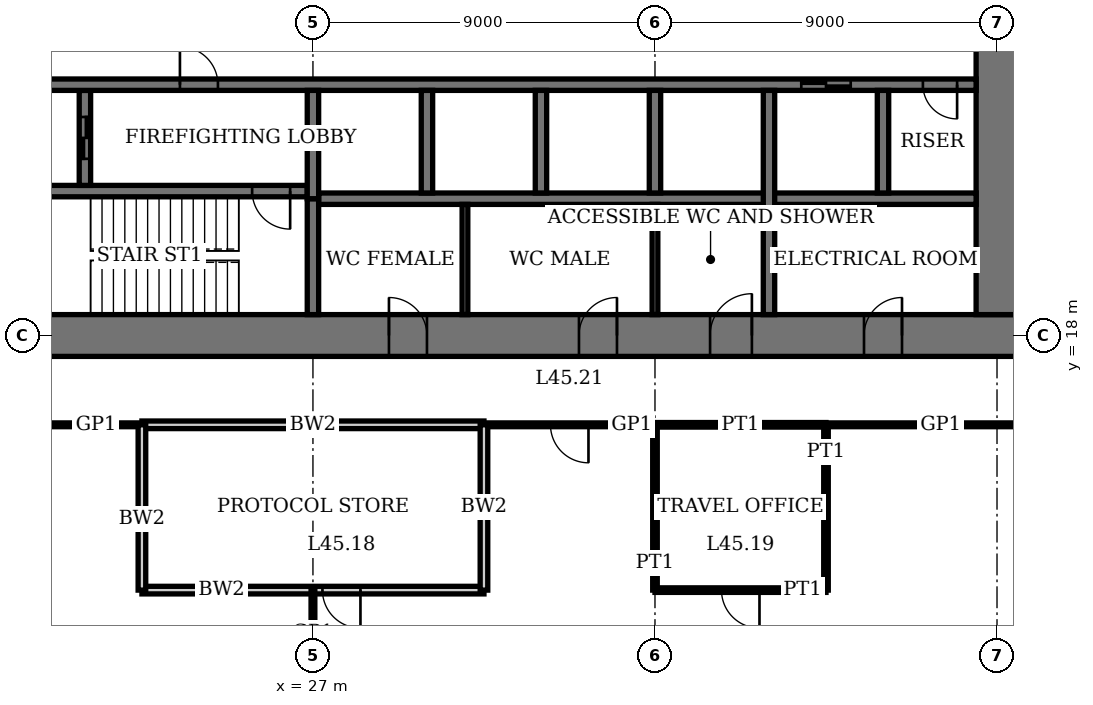
"""IFC4 building model, lengths in metres.
Left out: names, types, materials, properties, quantities, classifications, styles, units other than length and angle.
Written with IfcOpenShell. Run it as: python <this file> out.ifc"""

import sys

from ifc_helpers import new_model, si_unit, direction, frame, frame_2d, origin, place, context, subcontext, project, spatial, rectangle, extrude, element, fill, save


model = new_model("IFC4")
c1 = context("Model", 3, precision=1e-05, world=origin(), true_north=direction((0.0, 1.0)))
c2 = subcontext(c1, "Body", "Model", "MODEL_VIEW")
j1 = project(units=[si_unit("LENGTHUNIT", "METRE"), si_unit("PLANEANGLEUNIT", "RADIAN")], contexts=[c1])
p1 = place(None, origin())
s1 = spatial("IfcSite", under=j1, at=p1, CompositionType="ELEMENT")
p2 = place(p1, origin())
s2 = spatial("IfcBuilding", under=s1, at=p2, CompositionType="ELEMENT")
p3 = place(p2, frame((0.0, 0.0, 186.2)))
s3 = spatial("IfcBuildingStorey", under=s2, at=p3, CompositionType="ELEMENT", Elevation=186.2)
p4 = place(p3, frame((17.45, 18.0, 0.0), z_axis=(0.0, 0.0, 1.0), x_axis=(1.0, 0.0, 0.0)))
e1 = element("IfcWall", 1, at=p4, inside=s3, PredefinedType="SHEAR", context=c2, shape_type="SweptSolid", body=[
    extrude(rectangle(XDim=28.1, YDim=1.1, at=frame_2d((14.05, 0.0))), origin(), (0.0, 0.0, 1.0), 4.0),
])
p5 = place(p4, frame((11.55, 0.0, 0.0)))
e2 = element("IfcOpeningElement", 2, at=p5, cuts=e1, PredefinedType="OPENING", context=c2, shape_type="SweptSolid", body=[
    extrude(rectangle(XDim=1.0, YDim=2.4, at=frame_2d((0.5, 1.2))), frame((0.0, 0.56, 0.0), z_axis=(0.0, -1.0, 0.0), x_axis=(1.0, 0.0, 0.0)), (0.0, 0.0, 1.0), 1.12),
])
p6 = place(p4, frame((16.55, 0.0, 0.0)))
e3 = element("IfcOpeningElement", 3, at=p6, cuts=e1, PredefinedType="OPENING", context=c2, shape_type="SweptSolid", body=[
    extrude(rectangle(XDim=1.0, YDim=2.4, at=frame_2d((0.5, 1.2))), frame((0.0, 0.56, 0.0), z_axis=(0.0, -1.0, 0.0), x_axis=(1.0, 0.0, 0.0)), (0.0, 0.0, 1.0), 1.12),
])
p7 = place(p4, frame((20.0, 0.0, 0.0)))
e4 = element("IfcOpeningElement", 4, at=p7, cuts=e1, PredefinedType="OPENING", context=c2, shape_type="SweptSolid", body=[
    extrude(rectangle(XDim=1.1, YDim=2.4, at=frame_2d((0.55, 1.2))), frame((0.0, 0.56, 0.0), z_axis=(0.0, -1.0, 0.0), x_axis=(1.0, 0.0, 0.0)), (0.0, 0.0, 1.0), 1.12),
])
p8 = place(p4, frame((24.05, 0.0, 0.0)))
e5 = element("IfcOpeningElement", 5, at=p8, cuts=e1, PredefinedType="OPENING", context=c2, shape_type="SweptSolid", body=[
    extrude(rectangle(XDim=1.0, YDim=2.4, at=frame_2d((0.5, 1.2))), frame((0.0, 0.56, 0.0), z_axis=(0.0, -1.0, 0.0), x_axis=(1.0, 0.0, 0.0)), (0.0, 0.0, 1.0), 1.12),
])
p9 = place(p3, frame((45.0, 18.55, 0.0), z_axis=(0.0, 0.0, 1.0), x_axis=(0.0, 1.0, 0.0)))
e6 = element("IfcWall", 6, at=p9, inside=s3, PredefinedType="SHEAR", context=c2, shape_type="SweptSolid", body=[
    extrude(rectangle(XDim=16.9, YDim=1.1, at=frame_2d((8.45, 0.0))), origin(), (0.0, 0.0, 1.0), 4.0),
])
p10 = place(p9, frame((8.45, 0.0, 0.0)))
e7 = element("IfcOpeningElement", 7, at=p10, cuts=e6, PredefinedType="OPENING", context=c2, shape_type="SweptSolid", body=[
    extrude(rectangle(XDim=1.8, YDim=2.4, at=frame_2d((0.9, 1.2))), frame((0.0, 0.56, 0.0), z_axis=(0.0, -1.0, 0.0), x_axis=(1.0, 0.0, 0.0)), (0.0, 0.0, 1.0), 1.12),
])
p11 = place(p3, frame((18.55, 21.8, 0.0), z_axis=(0.0, 0.0, 1.0), x_axis=(1.0, 0.0, 0.0)))
e8 = element("IfcWall", 8, at=p11, inside=s3, PredefinedType="SHEAR", context=c2, shape_type="SweptSolid", body=[
    extrude(rectangle(XDim=8.3, YDim=0.3, at=frame_2d((4.15, 0.0))), origin(), (0.0, 0.0, 1.0), 4.0),
])
p12 = place(p11, frame((6.85, 0.0, 0.0)))
e9 = element("IfcOpeningElement", 9, at=p12, cuts=e8, PredefinedType="OPENING", context=c2, shape_type="SweptSolid", body=[
    extrude(rectangle(XDim=1.0, YDim=2.4, at=frame_2d((0.5, 1.2))), frame((0.0, 0.16, 0.0), z_axis=(0.0, -1.0, 0.0), x_axis=(1.0, 0.0, 0.0)), (0.0, 0.0, 1.0), 0.32),
])
p13 = place(p3, frame((27.0, 18.55, 0.0), z_axis=(0.0, 0.0, 1.0), x_axis=(0.0, 1.0, 0.0)))
e10 = element("IfcWall", 10, at=p13, inside=s3, PredefinedType="SHEAR", context=c2, shape_type="SweptSolid", body=[
    extrude(rectangle(XDim=3.05, YDim=0.3, at=frame_2d((1.525, 0.0))), origin(), (0.0, 0.0, 1.0), 4.0),
])
p14 = place(p3, frame((21.0, 21.95, 0.0), z_axis=(0.0, 0.0, 1.0), x_axis=(0.0, 1.0, 0.0)))
e11 = element("IfcWall", 11, at=p14, inside=s3, PredefinedType="SHEAR", context=c2, shape_type="SweptSolid", body=[
    extrude(rectangle(XDim=2.5, YDim=0.3, at=frame_2d((1.25, 0.0))), origin(), (0.0, 0.0, 1.0), 4.0),
])
p15 = place(p14, frame((0.7, 0.0, 0.0)))
e12 = element("IfcOpeningElement", 12, at=p15, cuts=e11, PredefinedType="OPENING", context=c2, shape_type="SweptSolid", body=[
    extrude(rectangle(XDim=1.1, YDim=2.4, at=frame_2d((0.55, 1.2))), frame((0.0, 0.16, 0.0), z_axis=(0.0, -1.0, 0.0), x_axis=(1.0, 0.0, 0.0)), (0.0, 0.0, 1.0), 0.32),
])
p16 = place(p3, frame((18.55, 24.6, 0.0), z_axis=(0.0, 0.0, 1.0), x_axis=(1.0, 0.0, 0.0)))
e13 = element("IfcWall", 13, at=p16, inside=s3, PredefinedType="SHEAR", context=c2, shape_type="SweptSolid", body=[
    extrude(rectangle(XDim=25.9, YDim=0.3, at=frame_2d((12.95, 0.0))), origin(), (0.0, 0.0, 1.0), 4.0),
])
p17 = place(p16, frame((4.95, 0.0, 0.0)))
e14 = element("IfcOpeningElement", 14, at=p17, cuts=e13, PredefinedType="OPENING", context=c2, shape_type="SweptSolid", body=[
    extrude(rectangle(XDim=1.0, YDim=2.4, at=frame_2d((0.5, 1.2))), frame((0.0, 0.16, 0.0), z_axis=(0.0, -1.0, 0.0), x_axis=(1.0, 0.0, 0.0)), (0.0, 0.0, 1.0), 0.32),
])
p18 = place(p16, frame((24.5, 0.0, 0.0)))
e15 = element("IfcOpeningElement", 15, at=p18, cuts=e13, PredefinedType="OPENING", context=c2, shape_type="SweptSolid", body=[
    extrude(rectangle(XDim=0.9, YDim=2.1, at=frame_2d((0.45, 1.05))), frame((0.0, 0.16, 0.0), z_axis=(0.0, -1.0, 0.0), x_axis=(1.0, 0.0, 0.0)), (0.0, 0.0, 1.0), 0.32),
])
p19 = place(p16, frame((21.3, 0.0, 0.0)))
e16 = element("IfcOpeningElement", 16, at=p19, cuts=e13, PredefinedType="OPENING", context=c2, shape_type="SweptSolid", body=[
    extrude(rectangle(XDim=1.3, YDim=2.4, at=frame_2d((0.65, 1.2))), frame((0.0, 0.16, 0.0), z_axis=(0.0, -1.0, 0.0), x_axis=(1.0, 0.0, 0.0)), (0.0, 0.0, 1.0), 0.32),
])
p20 = place(p3, frame((27.15, 21.6, 0.0), z_axis=(0.0, 0.0, 1.0), x_axis=(1.0, 0.0, 0.0)))
e17 = element("IfcWall", 17, at=p20, inside=s3, PredefinedType="SHEAR", context=c2, shape_type="SweptSolid", body=[
    extrude(rectangle(XDim=17.3, YDim=0.3, at=frame_2d((8.65, 0.0))), origin(), (0.0, 0.0, 1.0), 4.0),
])
for number, where, z_axis, x_axis in (
    (18, (30.0, 21.75, 0.0), (0.0, 0.0, 1.0), (0.0, 1.0, 0.0)),
    (19, (33.0, 21.75, 0.0), (0.0, 0.0, 1.0), (0.0, 1.0, 0.0)),
    (20, (36.0, 21.75, 0.0), (0.0, 0.0, 1.0), (0.0, 1.0, 0.0)),
):
    element("IfcWall", number, at=place(p3, frame(where, z_axis=z_axis, x_axis=x_axis)), inside=s3, PredefinedType="SHEAR", context=c2, shape_type="SweptSolid", body=[
        extrude(rectangle(XDim=2.7, YDim=0.3, at=frame_2d((1.35, 0.0))), origin(), (0.0, 0.0, 1.0), 4.0),
    ])
p21 = place(p3, frame((39.0, 18.55, 0.0), z_axis=(0.0, 0.0, 1.0), x_axis=(0.0, 1.0, 0.0)))
e21 = element("IfcWall", 21, at=p21, inside=s3, PredefinedType="SHEAR", context=c2, shape_type="SweptSolid", body=[
    extrude(rectangle(XDim=5.9, YDim=0.3, at=frame_2d((2.95, 0.0))), origin(), (0.0, 0.0, 1.0), 4.0),
])
p22 = place(p3, frame((42.0, 21.75, 0.0), z_axis=(0.0, 0.0, 1.0), x_axis=(0.0, 1.0, 0.0)))
e22 = element("IfcWall", 22, at=p22, inside=s3, PredefinedType="SHEAR", context=c2, shape_type="SweptSolid", body=[
    extrude(rectangle(XDim=2.7, YDim=0.3, at=frame_2d((1.35, 0.0))), origin(), (0.0, 0.0, 1.0), 4.0),
])
p23 = place(p3, frame((27.0, 21.6, 0.0), z_axis=(0.0, 0.0, 1.0), x_axis=(0.0, 1.0, 0.0)))
e23 = element("IfcWall", 23, at=p23, inside=s3, PredefinedType="SHEAR", context=c2, shape_type="SweptSolid", body=[
    extrude(rectangle(XDim=2.85, YDim=0.3, at=frame_2d((1.425, 0.0))), origin(), (0.0, 0.0, 1.0), 4.0),
])
p24 = place(p3, frame((22.5, 11.3, 0.0), z_axis=(0.0, 0.0, 1.0), x_axis=(1.0, 0.0, 0.0)))
e24 = element("IfcWall", 24, at=p24, inside=s3, PredefinedType="SOLIDWALL", context=c2, shape_type="SweptSolid", body=[
    extrude(rectangle(XDim=9.0, YDim=0.2, at=frame_2d((4.5, 0.0))), origin(), (0.0, 0.0, 1.0), 3.75),
])
p25 = place(p24, frame((4.75, 0.0, 0.0)))
e25 = element("IfcOpeningElement", 25, at=p25, cuts=e24, PredefinedType="OPENING", context=c2, shape_type="SweptSolid", body=[
    extrude(rectangle(XDim=1.0, YDim=2.4, at=frame_2d((0.5, 1.2))), frame((0.0, 0.11, 0.0), z_axis=(0.0, -1.0, 0.0), x_axis=(1.0, 0.0, 0.0)), (0.0, 0.0, 1.0), 0.22),
])
p26 = place(p3, frame((36.0, 11.3, 0.0), z_axis=(0.0, 0.0, 1.0), x_axis=(1.0, 0.0, 0.0)))
e26 = element("IfcWall", 26, at=p26, inside=s3, PredefinedType="PARTITIONING", context=c2, shape_type="SweptSolid", body=[
    extrude(rectangle(XDim=4.5, YDim=0.12, at=frame_2d((2.25, 0.0))), origin(), (0.0, 0.0, 1.0), 3.75),
])
p27 = place(p26, frame((1.75, 0.0, 0.0)))
e27 = element("IfcOpeningElement", 27, at=p27, cuts=e26, PredefinedType="OPENING", context=c2, shape_type="SweptSolid", body=[
    extrude(rectangle(XDim=1.0, YDim=2.4, at=frame_2d((0.5, 1.2))), frame((0.0, 0.07, 0.0), z_axis=(0.0, -1.0, 0.0), x_axis=(1.0, 0.0, 0.0)), (0.0, 0.0, 1.0), 0.14),
])
p28 = place(p3, frame((22.5, 15.65, 0.0), z_axis=(0.0, 0.0, 1.0), x_axis=(1.0, 0.0, 0.0)))
e28 = element("IfcWall", 28, at=p28, inside=s3, PredefinedType="SOLIDWALL", context=c2, shape_type="SweptSolid", body=[
    extrude(rectangle(XDim=9.0, YDim=0.2, at=frame_2d((4.5, 0.0))), origin(), (0.0, 0.0, 1.0), 3.75),
])
p29 = place(p3, frame((36.0, 15.65, 0.0), z_axis=(0.0, 0.0, 1.0), x_axis=(1.0, 0.0, 0.0)))
e29 = element("IfcWall", 29, at=p29, inside=s3, PredefinedType="PARTITIONING", context=c2, shape_type="SweptSolid", body=[
    extrude(rectangle(XDim=4.5, YDim=0.12, at=frame_2d((2.25, 0.0))), origin(), (0.0, 0.0, 1.0), 3.75),
])
p30 = place(p3, frame((15.65, 15.65, 0.0), z_axis=(0.0, 0.0, 1.0), x_axis=(1.0, 0.0, 0.0)))
e30 = element("IfcWall", 30, at=p30, inside=s3, PredefinedType="PARTITIONING", context=c2, shape_type="SweptSolid", body=[
    extrude(rectangle(XDim=6.85, YDim=0.1, at=frame_2d((3.425, 0.0))), origin(), (0.0, 0.0, 1.0), 3.75),
])
p31 = place(p30, frame((2.925, 0.0, 0.0)))
e31 = element("IfcOpeningElement", 31, at=p31, cuts=e30, PredefinedType="OPENING", context=c2, shape_type="SweptSolid", body=[
    extrude(rectangle(XDim=1.0, YDim=2.4, at=frame_2d((0.5, 1.2))), frame((0.0, 0.06, 0.0), z_axis=(0.0, -1.0, 0.0), x_axis=(1.0, 0.0, 0.0)), (0.0, 0.0, 1.0), 0.12),
])
p32 = place(p3, frame((31.5, 15.65, 0.0), z_axis=(0.0, 0.0, 1.0), x_axis=(1.0, 0.0, 0.0)))
e32 = element("IfcWall", 32, at=p32, inside=s3, PredefinedType="PARTITIONING", context=c2, shape_type="SweptSolid", body=[
    extrude(rectangle(XDim=4.5, YDim=0.1, at=frame_2d((2.25, 0.0))), origin(), (0.0, 0.0, 1.0), 3.75),
])
p33 = place(p32, frame((1.75, 0.0, 0.0)))
e33 = element("IfcOpeningElement", 33, at=p33, cuts=e32, PredefinedType="OPENING", context=c2, shape_type="SweptSolid", body=[
    extrude(rectangle(XDim=1.0, YDim=2.4, at=frame_2d((0.5, 1.2))), frame((0.0, 0.06, 0.0), z_axis=(0.0, -1.0, 0.0), x_axis=(1.0, 0.0, 0.0)), (0.0, 0.0, 1.0), 0.12),
])
p34 = place(p3, frame((40.5, 15.65, 0.0), z_axis=(0.0, 0.0, 1.0), x_axis=(1.0, 0.0, 0.0)))
e34 = element("IfcWall", 34, at=p34, inside=s3, PredefinedType="PARTITIONING", context=c2, shape_type="SweptSolid", body=[
    extrude(rectangle(XDim=6.85, YDim=0.1, at=frame_2d((3.425, 0.0))), origin(), (0.0, 0.0, 1.0), 3.75),
])
p35 = place(p3, frame((22.5, 11.3, 0.0), z_axis=(0.0, 0.0, 1.0), x_axis=(0.0, 1.0, 0.0)))
e35 = element("IfcWall", 35, at=p35, inside=s3, PredefinedType="SOLIDWALL", context=c2, shape_type="SweptSolid", body=[
    extrude(rectangle(XDim=4.35, YDim=0.2, at=frame_2d((2.175, 0.0))), origin(), (0.0, 0.0, 1.0), 3.75),
])
p36 = place(p3, frame((27.0, 9.8, 0.0), z_axis=(0.0, 0.0, 1.0), x_axis=(0.0, 1.0, 0.0)))
e36 = element("IfcWall", 36, at=p36, inside=s3, PredefinedType="PARTITIONING", context=c2, shape_type="SweptSolid", body=[
    extrude(rectangle(XDim=1.51, YDim=0.1, at=frame_2d((0.755, 0.0))), origin(), (0.0, 0.0, 1.0), 3.05),
])
p37 = place(p3, frame((31.5, 11.3, 0.0), z_axis=(0.0, 0.0, 1.0), x_axis=(0.0, 1.0, 0.0)))
e37 = element("IfcWall", 37, at=p37, inside=s3, PredefinedType="SOLIDWALL", context=c2, shape_type="SweptSolid", body=[
    extrude(rectangle(XDim=4.35, YDim=0.2, at=frame_2d((2.175, 0.0))), origin(), (0.0, 0.0, 1.0), 3.75),
])
p38 = place(p3, frame((36.0, 11.3, 0.0), z_axis=(0.0, 0.0, 1.0), x_axis=(0.0, 1.0, 0.0)))
e38 = element("IfcWall", 38, at=p38, inside=s3, PredefinedType="PARTITIONING", context=c2, shape_type="SweptSolid", body=[
    extrude(rectangle(XDim=4.35, YDim=0.12, at=frame_2d((2.175, 0.0))), origin(), (0.0, 0.0, 1.0), 3.05),
])
p39 = place(p3, frame((40.5, 11.3, 0.0), z_axis=(0.0, 0.0, 1.0), x_axis=(0.0, 1.0, 0.0)))
e39 = element("IfcWall", 39, at=p39, inside=s3, PredefinedType="PARTITIONING", context=c2, shape_type="SweptSolid", body=[
    extrude(rectangle(XDim=4.35, YDim=0.12, at=frame_2d((2.175, 0.0))), origin(), (0.0, 0.0, 1.0), 3.75),
])
for number, where, z_axis, x_axis in (
    (40, (31.0, 18.55, 0.0), (0.0, 0.0, 1.0), (0.0, 1.0, 0.0)),
    (41, (36.0, 18.55, 0.0), (0.0, 0.0, 1.0), (0.0, 1.0, 0.0)),
):
    element("IfcWall", number, at=place(p3, frame(where, z_axis=z_axis, x_axis=x_axis)), inside=s3, PredefinedType="PARTITIONING", context=c2, shape_type="SweptSolid", body=[
        extrude(rectangle(XDim=2.9, YDim=0.15, at=frame_2d((1.45, 0.0))), origin(), (0.0, 0.0, 1.0), 3.75),
    ])
p40 = place(p5, origin())
e42 = element("IfcDoor", 42, at=p40, inside=s3, OperationType="SINGLE_SWING_RIGHT", PredefinedType="DOOR", context=c2, shape_type="SweptSolid", body=[
    extrude(rectangle(XDim=1.0, YDim=2.4, at=frame_2d((0.5, 1.2))), frame((0.0, 0.025, 0.0), z_axis=(0.0, -1.0, 0.0), x_axis=(1.0, 0.0, 0.0)), (0.0, 0.0, 1.0), 0.05),
    extrude(rectangle(XDim=0.04, YDim=2.4, at=frame_2d((0.02, 1.2))), frame((0.0, 0.4, 0.0), z_axis=(0.0, -1.0, 0.0), x_axis=(1.0, 0.0, 0.0)), (0.0, 0.0, 1.0), 0.8),
    extrude(rectangle(XDim=0.04, YDim=2.4, at=frame_2d((0.98, 1.2))), frame((0.0, 0.4, 0.0), z_axis=(0.0, -1.0, 0.0), x_axis=(1.0, 0.0, 0.0)), (0.0, 0.0, 1.0), 0.8),
    extrude(rectangle(XDim=1.0, YDim=0.04, at=frame_2d((0.5, 2.38))), frame((0.0, 0.4, 0.0), z_axis=(0.0, -1.0, 0.0), x_axis=(1.0, 0.0, 0.0)), (0.0, 0.0, 1.0), 0.8),
])
fill(e2, e42)
p41 = place(p6, origin())
e43 = element("IfcDoor", 43, at=p41, inside=s3, OperationType="SINGLE_SWING_LEFT", PredefinedType="DOOR", context=c2, shape_type="SweptSolid", body=[
    extrude(rectangle(XDim=1.0, YDim=2.4, at=frame_2d((0.5, 1.2))), frame((0.0, 0.025, 0.0), z_axis=(0.0, -1.0, 0.0), x_axis=(1.0, 0.0, 0.0)), (0.0, 0.0, 1.0), 0.05),
    extrude(rectangle(XDim=0.04, YDim=2.4, at=frame_2d((0.02, 1.2))), frame((0.0, 0.4, 0.0), z_axis=(0.0, -1.0, 0.0), x_axis=(1.0, 0.0, 0.0)), (0.0, 0.0, 1.0), 0.8),
    extrude(rectangle(XDim=0.04, YDim=2.4, at=frame_2d((0.98, 1.2))), frame((0.0, 0.4, 0.0), z_axis=(0.0, -1.0, 0.0), x_axis=(1.0, 0.0, 0.0)), (0.0, 0.0, 1.0), 0.8),
    extrude(rectangle(XDim=1.0, YDim=0.04, at=frame_2d((0.5, 2.38))), frame((0.0, 0.4, 0.0), z_axis=(0.0, -1.0, 0.0), x_axis=(1.0, 0.0, 0.0)), (0.0, 0.0, 1.0), 0.8),
])
fill(e3, e43)
p42 = place(p7, origin())
e44 = element("IfcDoor", 44, at=p42, inside=s3, OperationType="SINGLE_SWING_LEFT", PredefinedType="DOOR", context=c2, shape_type="SweptSolid", body=[
    extrude(rectangle(XDim=1.1, YDim=2.4, at=frame_2d((0.55, 1.2))), frame((0.0, 0.025, 0.0), z_axis=(0.0, -1.0, 0.0), x_axis=(1.0, 0.0, 0.0)), (0.0, 0.0, 1.0), 0.05),
    extrude(rectangle(XDim=0.04, YDim=2.4, at=frame_2d((0.02, 1.2))), frame((0.0, 0.44, 0.0), z_axis=(0.0, -1.0, 0.0), x_axis=(1.0, 0.0, 0.0)), (0.0, 0.0, 1.0), 0.88),
    extrude(rectangle(XDim=0.04, YDim=2.4, at=frame_2d((1.08, 1.2))), frame((0.0, 0.44, 0.0), z_axis=(0.0, -1.0, 0.0), x_axis=(1.0, 0.0, 0.0)), (0.0, 0.0, 1.0), 0.88),
    extrude(rectangle(XDim=1.1, YDim=0.04, at=frame_2d((0.55, 2.38))), frame((0.0, 0.44, 0.0), z_axis=(0.0, -1.0, 0.0), x_axis=(1.0, 0.0, 0.0)), (0.0, 0.0, 1.0), 0.88),
])
fill(e4, e44)
p43 = place(p8, origin())
e45 = element("IfcDoor", 45, at=p43, inside=s3, OperationType="SINGLE_SWING_LEFT", PredefinedType="DOOR", context=c2, shape_type="SweptSolid", body=[
    extrude(rectangle(XDim=1.0, YDim=2.4, at=frame_2d((0.5, 1.2))), frame((0.0, 0.025, 0.0), z_axis=(0.0, -1.0, 0.0), x_axis=(1.0, 0.0, 0.0)), (0.0, 0.0, 1.0), 0.05),
    extrude(rectangle(XDim=0.04, YDim=2.4, at=frame_2d((0.02, 1.2))), frame((0.0, 0.4, 0.0), z_axis=(0.0, -1.0, 0.0), x_axis=(1.0, 0.0, 0.0)), (0.0, 0.0, 1.0), 0.8),
    extrude(rectangle(XDim=0.04, YDim=2.4, at=frame_2d((0.98, 1.2))), frame((0.0, 0.4, 0.0), z_axis=(0.0, -1.0, 0.0), x_axis=(1.0, 0.0, 0.0)), (0.0, 0.0, 1.0), 0.8),
    extrude(rectangle(XDim=1.0, YDim=0.04, at=frame_2d((0.5, 2.38))), frame((0.0, 0.4, 0.0), z_axis=(0.0, -1.0, 0.0), x_axis=(1.0, 0.0, 0.0)), (0.0, 0.0, 1.0), 0.8),
])
fill(e5, e45)
p44 = place(p12, origin())
e46 = element("IfcDoor", 46, at=p44, inside=s3, OperationType="SINGLE_SWING_RIGHT", PredefinedType="DOOR", context=c2, shape_type="SweptSolid", body=[
    extrude(rectangle(XDim=1.0, YDim=2.4, at=frame_2d((0.5, 1.2))), frame((0.0, 0.03, 0.0), z_axis=(0.0, -1.0, 0.0), x_axis=(1.0, 0.0, 0.0)), (0.0, 0.0, 1.0), 0.06),
])
fill(e9, e46)
p45 = place(p17, origin())
e47 = element("IfcDoor", 47, at=p45, inside=s3, OperationType="SINGLE_SWING_RIGHT", PredefinedType="DOOR", context=c2, shape_type="SweptSolid", body=[
    extrude(rectangle(XDim=1.0, YDim=2.4, at=frame_2d((0.5, 1.2))), frame((0.0, 0.03, 0.0), z_axis=(0.0, -1.0, 0.0), x_axis=(1.0, 0.0, 0.0)), (0.0, 0.0, 1.0), 0.06),
])
fill(e14, e47)
p46 = place(p18, origin())
e48 = element("IfcDoor", 48, at=p46, inside=s3, OperationType="SINGLE_SWING_RIGHT", PredefinedType="DOOR", context=c2, shape_type="SweptSolid", body=[
    extrude(rectangle(XDim=0.9, YDim=2.1, at=frame_2d((0.45, 1.05))), frame((0.0, 0.03, 0.0), z_axis=(0.0, -1.0, 0.0), x_axis=(1.0, 0.0, 0.0)), (0.0, 0.0, 1.0), 0.06),
])
fill(e15, e48)
p47 = place(p25, origin())
e49 = element("IfcDoor", 49, at=p47, inside=s3, OperationType="SINGLE_SWING_RIGHT", PredefinedType="DOOR", context=c2, shape_type="SweptSolid", body=[
    extrude(rectangle(XDim=1.0, YDim=2.4, at=frame_2d((0.5, 1.2))), frame((0.0, 0.035, 0.0), z_axis=(0.0, -1.0, 0.0), x_axis=(1.0, 0.0, 0.0)), (0.0, 0.0, 1.0), 0.07),
])
fill(e25, e49)
p48 = place(p27, origin())
e50 = element("IfcDoor", 50, at=p48, inside=s3, OperationType="SINGLE_SWING_RIGHT", PredefinedType="DOOR", context=c2, shape_type="SweptSolid", body=[
    extrude(rectangle(XDim=1.0, YDim=2.4, at=frame_2d((0.5, 1.2))), frame((0.0, 0.025, 0.0), z_axis=(0.0, -1.0, 0.0), x_axis=(1.0, 0.0, 0.0)), (0.0, 0.0, 1.0), 0.05),
])
fill(e27, e50)
p49 = place(p33, origin())
e51 = element("IfcDoor", 51, at=p49, inside=s3, OperationType="SINGLE_SWING_RIGHT", PredefinedType="DOOR", context=c2, shape_type="SweptSolid", body=[
    extrude(rectangle(XDim=1.0, YDim=2.4, at=frame_2d((0.5, 1.2))), frame((0.0, 0.02, 0.0), z_axis=(0.0, -1.0, 0.0), x_axis=(1.0, 0.0, 0.0)), (0.0, 0.0, 1.0), 0.04),
])
fill(e33, e51)
p50 = place(p19, origin())
e52 = element("IfcDoor", 52, at=p50, inside=s3, OperationType="DOUBLE_DOOR_SLIDING", PredefinedType="DOOR", context=c2, shape_type="SweptSolid", body=[
    extrude(rectangle(XDim=1.3, YDim=2.4, at=frame_2d((0.65, 1.2))), frame((0.0, 0.02, 0.0), z_axis=(0.0, -1.0, 0.0), x_axis=(1.0, 0.0, 0.0)), (0.0, 0.0, 1.0), 0.04),
])
fill(e16, e52)
p51 = place(p15, origin())
e53 = element("IfcDoor", 53, at=p51, inside=s3, OperationType="DOUBLE_DOOR_SLIDING", PredefinedType="DOOR", context=c2, shape_type="SweptSolid", body=[
    extrude(rectangle(XDim=1.1, YDim=2.4, at=frame_2d((0.55, 1.2))), frame((0.0, 0.03, 0.0), z_axis=(0.0, -1.0, 0.0), x_axis=(1.0, 0.0, 0.0)), (0.0, 0.0, 1.0), 0.06),
])
fill(e12, e53)
save(model, sys.argv[1])
